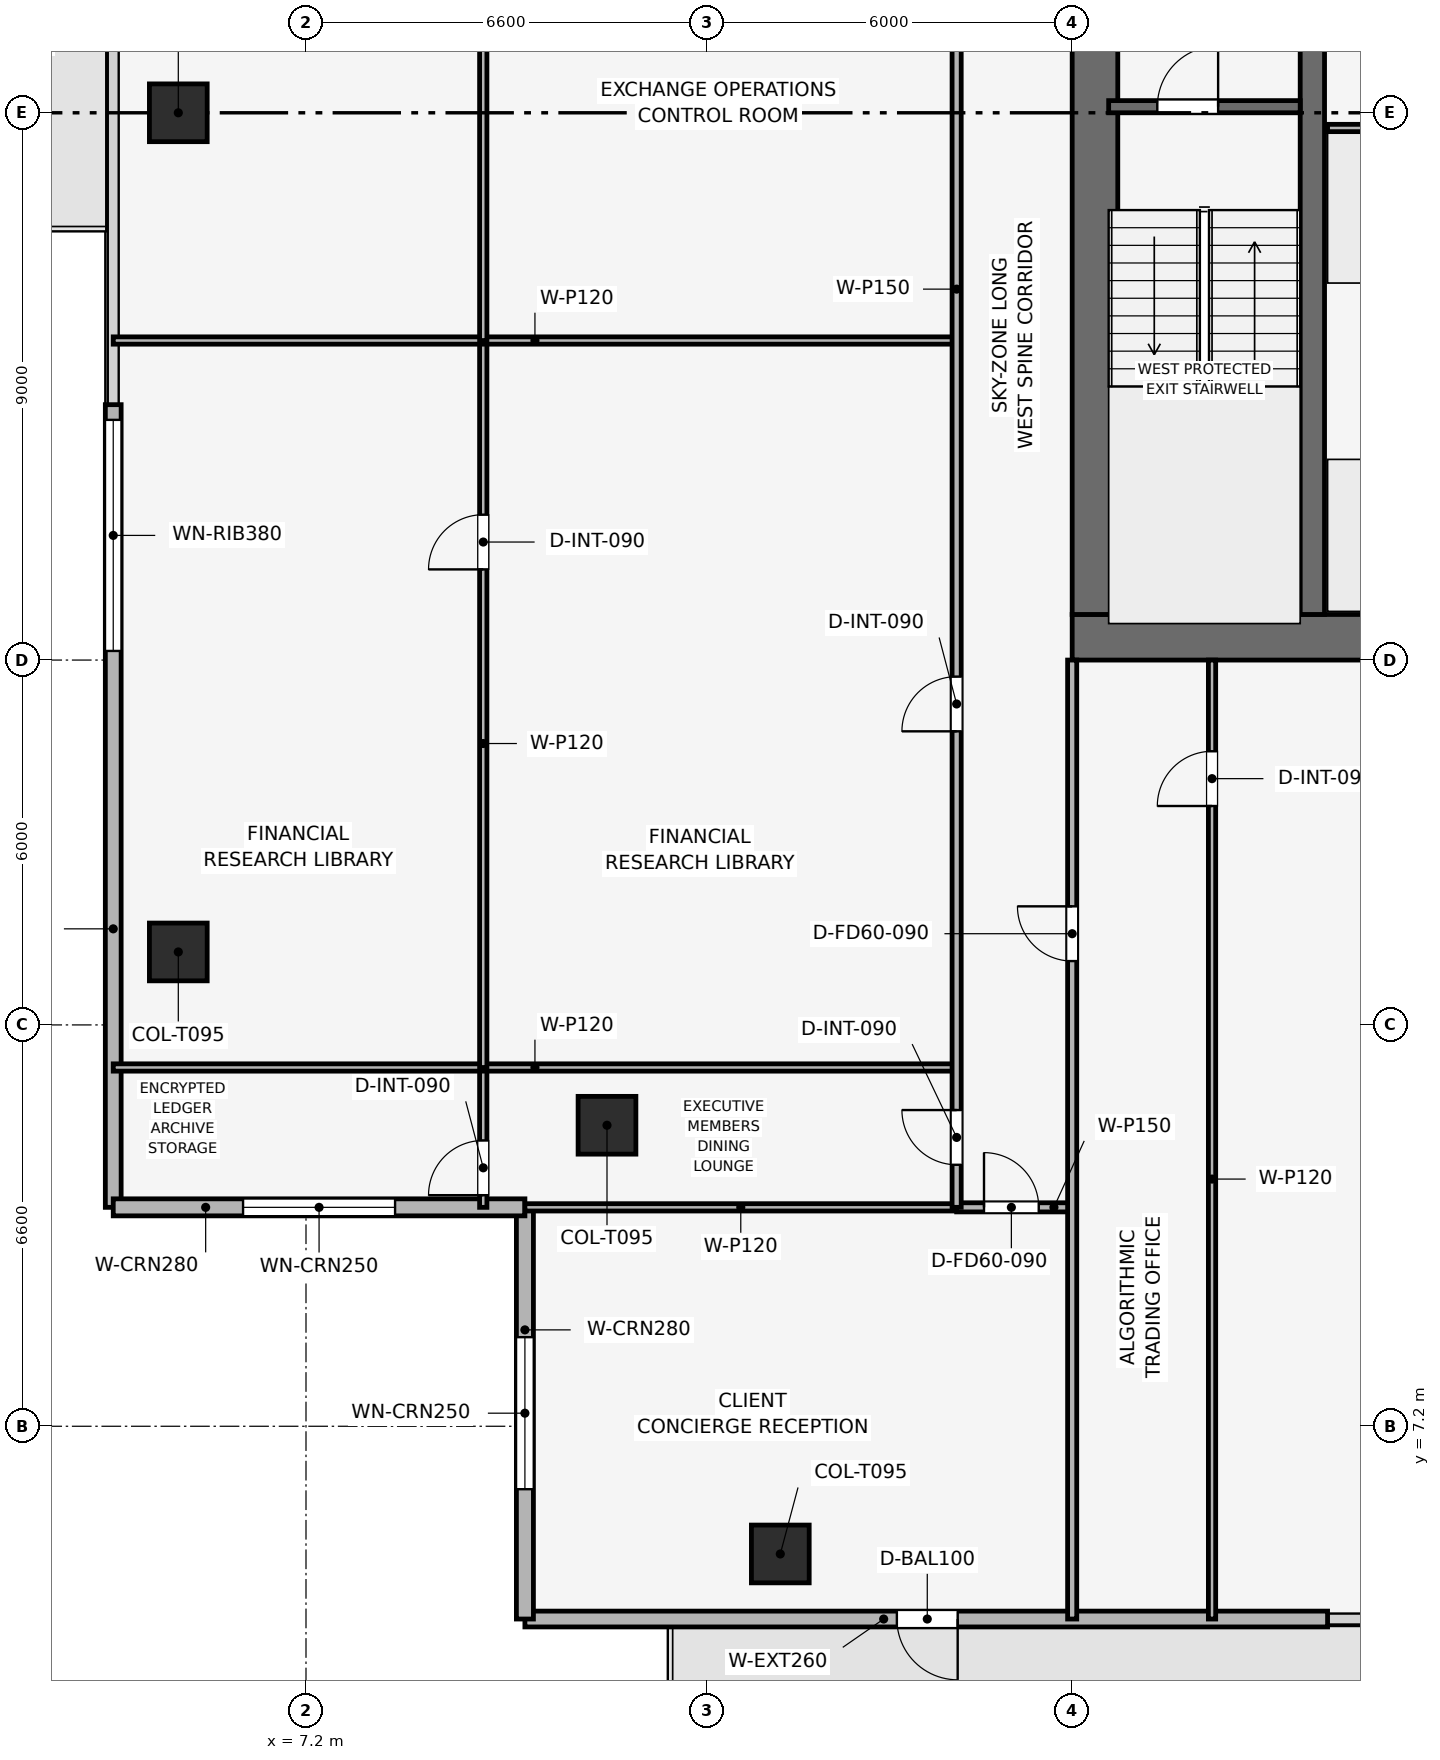
"""IFC4 building model, lengths in metres.
Left out: names, types, materials, properties, quantities, classifications, styles, units other than length and angle.
Written with IfcOpenShell. Run it as: python <this file> out.ifc"""

import sys

from ifc_helpers import new_model, si_unit, direction, frame, frame_2d, origin, origin_2d, place, context, subcontext, project, spatial, rectangle, extrude, element, fill, save


model = new_model("IFC4")
c1 = context("Model", 3, precision=1e-05, world=origin(), true_north=direction((0.0, 1.0)))
c2 = subcontext(c1, "Body", "Model", "MODEL_VIEW")
j1 = project(units=[si_unit("LENGTHUNIT", "METRE"), si_unit("PLANEANGLEUNIT", "RADIAN")], contexts=[c1])
p1 = place(None, origin())
s1 = spatial("IfcSite", under=j1, at=p1, CompositionType="ELEMENT")
p2 = place(p1, origin())
s2 = spatial("IfcBuilding", under=s1, at=p2, CompositionType="ELEMENT")
p3 = place(p2, frame((0.0, 0.0, 254.1)))
s3 = spatial("IfcBuildingStorey", under=s2, at=p3, CompositionType="ELEMENT", Elevation=254.1)
p4 = place(p3, frame((19.8, 20.175, 0.0), z_axis=(0.0, 0.0, 1.0), x_axis=(1.0, 0.0, 0.0)))
e1 = element("IfcWall", 1, at=p4, inside=s3, PredefinedType="SHEAR", context=c2, shape_type="SweptSolid", body=[
    extrude(rectangle(XDim=18.0, YDim=0.75, at=frame_2d((9.0, 0.0))), origin(), (0.0, 0.0, 1.0), 3.75),
])
p5 = place(p3, frame((20.175, 20.55, 0.0), z_axis=(0.0, 0.0, 1.0), x_axis=(0.0, 1.0, 0.0)))
e2 = element("IfcWall", 2, at=p5, inside=s3, PredefinedType="SHEAR", context=c2, shape_type="SweptSolid", body=[
    extrude(rectangle(XDim=16.5, YDim=0.75, at=frame_2d((8.25, 0.0))), origin(), (0.0, 0.0, 1.0), 3.75),
])
p6 = place(p5, frame((10.25, 0.0, 0.0)))
e3 = element("IfcOpeningElement", 3, at=p6, cuts=e2, PredefinedType="OPENING", context=c2, shape_type="SweptSolid", body=[
    extrude(rectangle(XDim=1.1, YDim=2.15, at=frame_2d((0.55, 1.075))), frame((0.0, 0.385, 0.0), z_axis=(0.0, -1.0, 0.0), x_axis=(1.0, 0.0, 0.0)), (0.0, 0.0, 1.0), 0.77),
])
p7 = place(p3, frame((23.75, 20.55, 0.0), z_axis=(0.0, 0.0, 1.0), x_axis=(0.0, 1.0, 0.0)))
e4 = element("IfcWall", 4, at=p7, inside=s3, PredefinedType="SHEAR", context=c2, shape_type="SweptSolid", body=[
    extrude(rectangle(XDim=16.5, YDim=0.4, at=frame_2d((8.25, 0.0))), origin(), (0.0, 0.0, 1.0), 3.75),
])
for number, where, z_axis, x_axis in (
    (5, (15.0, 5.1, 0.003), (0.0, 0.0, 1.0), (1.0, 0.0, 0.0)),
    (6, (5.1, 28.8, 0.003), (0.0, 0.0, 1.0), (1.0, 0.0, 0.0)),
    (7, (5.1, 15.0, 0.003), (0.0, 0.0, 1.0), (1.0, 0.0, 0.0)),
    (8, (12.15, 12.15, 0.003), (0.0, 0.0, 1.0), (1.0, 0.0, 0.0)),
):
    element("IfcColumn", number, at=place(p3, frame(where, z_axis=z_axis, x_axis=x_axis)), inside=s3, PredefinedType="COLUMN", context=c2, shape_type="SweptSolid", body=[
        extrude(rectangle(XDim=0.95, YDim=0.95, at=origin_2d()), origin(), (0.0, 0.0, 1.0), 3.494),
    ])
p8 = place(p3, frame((24.0, 4.03, 0.0), z_axis=(0.0, 0.0, 1.0), x_axis=(-1.0, 0.0, 0.0)))
e9 = element("IfcWall", 9, at=p8, inside=s3, PredefinedType="SOLIDWALL", context=c2, shape_type="SweptSolid", body=[
    extrude(rectangle(XDim=13.2, YDim=0.26, at=frame_2d((6.6, 0.0))), origin(), (0.0, 0.0, 1.0), 3.5),
])
p9 = place(p8, frame((6.083, 0.0, 0.0)))
e10 = element("IfcOpeningElement", 10, at=p9, cuts=e9, PredefinedType="OPENING", context=c2, shape_type="SweptSolid", body=[
    extrude(rectangle(XDim=1.0, YDim=2.2, at=frame_2d((0.5, 1.1))), frame((0.0, 0.14, 0.0), z_axis=(0.0, -1.0, 0.0), x_axis=(1.0, 0.0, 0.0)), (0.0, 0.0, 1.0), 0.28),
])
p10 = place(p3, frame((4.03, 10.8, 0.0), z_axis=(0.0, 0.0, 1.0), x_axis=(0.0, 1.0, 0.0)))
e11 = element("IfcWall", 11, at=p10, inside=s3, PredefinedType="SOLIDWALL", context=c2, shape_type="SweptSolid", body=[
    extrude(rectangle(XDim=13.2, YDim=0.26, at=frame_2d((6.6, 0.0))), origin(), (0.0, 0.0, 1.0), 3.5),
])
p11 = place(p10, frame((9.15, 0.0, 0.9)))
e12 = element("IfcOpeningElement", 12, at=p11, cuts=e11, PredefinedType="OPENING", context=c2, shape_type="SweptSolid", body=[
    extrude(rectangle(XDim=3.8, YDim=1.9, at=frame_2d((1.9, 0.95))), frame((0.0, 0.14, 0.0), z_axis=(0.0, -1.0, 0.0), x_axis=(1.0, 0.0, 0.0)), (0.0, 0.0, 1.0), 0.28),
])
p12 = place(p3, frame((10.8, 4.03, 0.0), z_axis=(0.0, 0.0, 1.0), x_axis=(0.0, 1.0, 0.0)))
e13 = element("IfcWall", 13, at=p12, inside=s3, PredefinedType="SOLIDWALL", context=c2, shape_type="SweptSolid", body=[
    extrude(rectangle(XDim=6.77, YDim=0.28, at=frame_2d((3.385, 0.0))), origin(), (0.0, 0.0, 1.0), 3.5),
])
p13 = place(p12, frame((2.135, 0.0, 0.9)))
e14 = element("IfcOpeningElement", 14, at=p13, cuts=e13, PredefinedType="OPENING", context=c2, shape_type="SweptSolid", body=[
    extrude(rectangle(XDim=2.5, YDim=1.9, at=frame_2d((1.25, 0.95))), frame((0.0, 0.15, 0.0), z_axis=(0.0, -1.0, 0.0), x_axis=(1.0, 0.0, 0.0)), (0.0, 0.0, 1.0), 0.3),
])
p14 = place(p3, frame((10.8, 10.8, 0.0), z_axis=(0.0, 0.0, 1.0), x_axis=(-1.0, 0.0, 0.0)))
e15 = element("IfcWall", 15, at=p14, inside=s3, PredefinedType="SOLIDWALL", context=c2, shape_type="SweptSolid", body=[
    extrude(rectangle(XDim=6.77, YDim=0.28, at=frame_2d((3.385, 0.0))), origin(), (0.0, 0.0, 1.0), 3.5),
])
p15 = place(p14, frame((2.135, 0.0, 0.9)))
e16 = element("IfcOpeningElement", 16, at=p15, cuts=e15, PredefinedType="OPENING", context=c2, shape_type="SweptSolid", body=[
    extrude(rectangle(XDim=2.5, YDim=1.9, at=frame_2d((1.25, 0.95))), frame((0.0, 0.15, 0.0), z_axis=(0.0, -1.0, 0.0), x_axis=(1.0, 0.0, 0.0)), (0.0, 0.0, 1.0), 0.3),
])
p16 = place(p3, frame((20.4, 28.9, 0.0), z_axis=(0.0, 0.0, 1.0), x_axis=(1.0, 0.0, 0.0)))
e17 = element("IfcWall", 17, at=p16, inside=s3, PredefinedType="SHEAR", context=c2, shape_type="SweptSolid", body=[
    extrude(rectangle(XDim=3.15, YDim=0.2, at=frame_2d((1.575, 0.0))), origin(), (0.0, 0.0, 1.0), 3.5),
])
p17 = place(p16, frame((0.8, 0.0, 0.0)))
e18 = element("IfcOpeningElement", 18, at=p17, cuts=e17, PredefinedType="OPENING", context=c2, shape_type="SweptSolid", body=[
    extrude(rectangle(XDim=1.0, YDim=2.1, at=frame_2d((0.5, 1.05))), frame((0.0, 0.11, 0.0), z_axis=(0.0, -1.0, 0.0), x_axis=(1.0, 0.0, 0.0)), (0.0, 0.0, 1.0), 0.22),
])
p18 = place(p3, frame((24.0, 28.55, 0.0), z_axis=(0.0, 0.0, 1.0), x_axis=(1.0, 0.0, 0.0)))
e19 = element("IfcWall", 19, at=p18, inside=s3, PredefinedType="PARTITIONING", context=c2, shape_type="SweptSolid", body=[
    extrude(rectangle(XDim=4.05, YDim=0.12, at=frame_2d((2.025, 0.0))), origin(), (0.0, 0.0, 1.0), 3.5),
])
p19 = place(p18, frame((1.575, 0.0, 0.0)))
e20 = element("IfcOpeningElement", 20, at=p19, cuts=e19, PredefinedType="OPENING", context=c2, shape_type="SweptSolid", body=[
    extrude(rectangle(XDim=0.9, YDim=2.1, at=frame_2d((0.45, 1.05))), frame((0.0, 0.07, 0.0), z_axis=(0.0, -1.0, 0.0), x_axis=(1.0, 0.0, 0.0)), (0.0, 0.0, 1.0), 0.14),
])
p20 = place(p3, frame((10.115, 10.8, 0.0), z_axis=(0.0, 0.0, 1.0), x_axis=(0.0, 1.0, 0.0)))
e21 = element("IfcWall", 21, at=p20, inside=s3, PredefinedType="PARTITIONING", context=c2, shape_type="SweptSolid", body=[
    extrude(rectangle(XDim=2.3, YDim=0.12, at=frame_2d((1.15, 0.0))), origin(), (0.0, 0.0, 1.0), 3.085),
])
p21 = place(p20, frame((0.2, 0.0, 0.0)))
e22 = element("IfcOpeningElement", 22, at=p21, cuts=e21, PredefinedType="OPENING", context=c2, shape_type="SweptSolid", body=[
    extrude(rectangle(XDim=0.9, YDim=2.1, at=frame_2d((0.45, 1.05))), frame((0.0, 0.07, 0.0), z_axis=(0.0, -1.0, 0.0), x_axis=(1.0, 0.0, 0.0)), (0.0, 0.0, 1.0), 0.14),
])
p22 = place(p3, frame((4.03, 13.1, 0.0), z_axis=(0.0, 0.0, 1.0), x_axis=(1.0, 0.0, 0.0)))
e23 = element("IfcWall", 23, at=p22, inside=s3, PredefinedType="PARTITIONING", context=c2, shape_type="SweptSolid", body=[
    extrude(rectangle(XDim=13.87, YDim=0.12, at=frame_2d((6.935, 0.0))), origin(), (0.0, 0.0, 1.0), 3.085),
])
p23 = place(p3, frame((10.115, 13.1, 0.0), z_axis=(0.0, 0.0, 1.0), x_axis=(0.0, 1.0, 0.0)))
e24 = element("IfcWall", 24, at=p23, inside=s3, PredefinedType="PARTITIONING", context=c2, shape_type="SweptSolid", body=[
    extrude(rectangle(XDim=11.955, YDim=0.12, at=frame_2d((5.978, 0.0))), origin(), (0.0, 0.0, 1.0), 3.085),
])
p24 = place(p23, frame((8.191, 0.0, 0.0)))
e25 = element("IfcOpeningElement", 25, at=p24, cuts=e24, PredefinedType="OPENING", context=c2, shape_type="SweptSolid", body=[
    extrude(rectangle(XDim=0.9, YDim=2.1, at=frame_2d((0.45, 1.05))), frame((0.0, 0.07, 0.0), z_axis=(0.0, -1.0, 0.0), x_axis=(1.0, 0.0, 0.0)), (0.0, 0.0, 1.0), 0.14),
])
p25 = place(p3, frame((4.03, 25.055, 0.0), z_axis=(0.0, 0.0, 1.0), x_axis=(1.0, 0.0, 0.0)))
e26 = element("IfcWall", 26, at=p25, inside=s3, PredefinedType="PARTITIONING", context=c2, shape_type="SweptSolid", body=[
    extrude(rectangle(XDim=13.87, YDim=0.12, at=frame_2d((6.935, 0.0))), origin(), (0.0, 0.0, 1.0), 3.085),
])
p26 = place(p3, frame((10.115, 25.055, 0.0), z_axis=(0.0, 0.0, 1.0), x_axis=(0.0, 1.0, 0.0)))
e27 = element("IfcWall", 27, at=p26, inside=s3, PredefinedType="PARTITIONING", context=c2, shape_type="SweptSolid", body=[
    extrude(rectangle(XDim=14.645, YDim=0.12, at=frame_2d((7.323, 0.0))), origin(), (0.0, 0.0, 1.0), 3.085),
])
p27 = place(p26, frame((10.209, 0.0, 0.0)))
e28 = element("IfcOpeningElement", 28, at=p27, cuts=e27, PredefinedType="OPENING", context=c2, shape_type="SweptSolid", body=[
    extrude(rectangle(XDim=0.9, YDim=2.1, at=frame_2d((0.45, 1.05))), frame((0.0, 0.07, 0.0), z_axis=(0.0, -1.0, 0.0), x_axis=(1.0, 0.0, 0.0)), (0.0, 0.0, 1.0), 0.14),
])
p28 = place(p3, frame((10.8, 10.8, 0.0), z_axis=(0.0, 0.0, 1.0), x_axis=(1.0, 0.0, 0.0)))
e29 = element("IfcWall", 29, at=p28, inside=s3, PredefinedType="PARTITIONING", context=c2, shape_type="SweptSolid", body=[
    extrude(rectangle(XDim=7.1, YDim=0.12, at=frame_2d((3.55, 0.0))), origin(), (0.0, 0.0, 1.0), 3.085),
])
p29 = place(p3, frame((17.9, 10.8, 0.0), z_axis=(0.0, 0.0, 1.0), x_axis=(1.0, 0.0, 0.0)))
e30 = element("IfcWall", 30, at=p29, inside=s3, PredefinedType="PARTITIONING", context=c2, shape_type="SweptSolid", body=[
    extrude(rectangle(XDim=1.9, YDim=0.15, at=frame_2d((0.95, 0.0))), origin(), (0.0, 0.0, 1.0), 3.5),
])
p30 = place(p29, frame((0.45, 0.0, 0.0)))
e31 = element("IfcOpeningElement", 31, at=p30, cuts=e30, PredefinedType="OPENING", context=c2, shape_type="SweptSolid", body=[
    extrude(rectangle(XDim=0.9, YDim=2.1, at=frame_2d((0.45, 1.05))), frame((0.0, 0.085, 0.0), z_axis=(0.0, -1.0, 0.0), x_axis=(1.0, 0.0, 0.0)), (0.0, 0.0, 1.0), 0.17),
])
p31 = place(p3, frame((19.8, 4.03, 0.0), z_axis=(0.0, 0.0, 1.0), x_axis=(0.0, 1.0, 0.0)))
e32 = element("IfcWall", 32, at=p31, inside=s3, PredefinedType="PARTITIONING", context=c2, shape_type="SweptSolid", body=[
    extrude(rectangle(XDim=15.77, YDim=0.15, at=frame_2d((7.885, 0.0))), origin(), (0.0, 0.0, 1.0), 3.085),
])
p32 = place(p31, frame((10.82, 0.0, 0.0)))
e33 = element("IfcOpeningElement", 33, at=p32, cuts=e32, PredefinedType="OPENING", context=c2, shape_type="SweptSolid", body=[
    extrude(rectangle(XDim=0.9, YDim=2.1, at=frame_2d((0.45, 1.05))), frame((0.0, 0.085, 0.0), z_axis=(0.0, -1.0, 0.0), x_axis=(1.0, 0.0, 0.0)), (0.0, 0.0, 1.0), 0.17),
])
p33 = place(p3, frame((22.1, 4.03, 0.0), z_axis=(0.0, 0.0, 1.0), x_axis=(0.0, 1.0, 0.0)))
e34 = element("IfcWall", 34, at=p33, inside=s3, PredefinedType="PARTITIONING", context=c2, shape_type="SweptSolid", body=[
    extrude(rectangle(XDim=15.77, YDim=0.12, at=frame_2d((7.885, 0.0))), origin(), (0.0, 0.0, 1.0), 3.085),
])
p34 = place(p33, frame((13.37, 0.0, 0.0)))
e35 = element("IfcOpeningElement", 35, at=p34, cuts=e34, PredefinedType="OPENING", context=c2, shape_type="SweptSolid", body=[
    extrude(rectangle(XDim=0.9, YDim=2.1, at=frame_2d((0.45, 1.05))), frame((0.0, 0.07, 0.0), z_axis=(0.0, -1.0, 0.0), x_axis=(1.0, 0.0, 0.0)), (0.0, 0.0, 1.0), 0.14),
])
p35 = place(p3, frame((17.9, 10.8, 0.0), z_axis=(0.0, 0.0, 1.0), x_axis=(0.0, 1.0, 0.0)))
e36 = element("IfcWall", 36, at=p35, inside=s3, PredefinedType="PARTITIONING", context=c2, shape_type="SweptSolid", body=[
    extrude(rectangle(XDim=28.9, YDim=0.15, at=frame_2d((14.45, 0.0))), origin(), (0.0, 0.0, 1.0), 3.085),
])
p36 = place(p35, frame((0.7, 0.0, 0.0)))
e37 = element("IfcOpeningElement", 37, at=p36, cuts=e36, PredefinedType="OPENING", context=c2, shape_type="SweptSolid", body=[
    extrude(rectangle(XDim=0.9, YDim=2.1, at=frame_2d((0.45, 1.05))), frame((0.0, 0.085, 0.0), z_axis=(0.0, -1.0, 0.0), x_axis=(1.0, 0.0, 0.0)), (0.0, 0.0, 1.0), 0.17),
])
p37 = place(p35, frame((7.828, 0.0, 0.0)))
e38 = element("IfcOpeningElement", 38, at=p37, cuts=e36, PredefinedType="OPENING", context=c2, shape_type="SweptSolid", body=[
    extrude(rectangle(XDim=0.9, YDim=2.1, at=frame_2d((0.45, 1.05))), frame((0.0, 0.085, 0.0), z_axis=(0.0, -1.0, 0.0), x_axis=(1.0, 0.0, 0.0)), (0.0, 0.0, 1.0), 0.17),
])
p38 = place(p35, frame((21.127, 0.0, 0.0)))
e39 = element("IfcOpeningElement", 39, at=p38, cuts=e36, PredefinedType="OPENING", context=c2, shape_type="SweptSolid", body=[
    extrude(rectangle(XDim=0.9, YDim=2.1, at=frame_2d((0.45, 1.05))), frame((0.0, 0.085, 0.0), z_axis=(0.0, -1.0, 0.0), x_axis=(1.0, 0.0, 0.0)), (0.0, 0.0, 1.0), 0.17),
])
p39 = place(p9, origin())
e40 = element("IfcDoor", 40, at=p39, inside=s3, OperationType="SINGLE_SWING_LEFT", PredefinedType="DOOR", context=c2, shape_type="SweptSolid", body=[
    extrude(rectangle(XDim=1.0, YDim=2.2, at=frame_2d((0.5, 1.1))), frame((0.0, 0.025, 0.0), z_axis=(0.0, -1.0, 0.0), x_axis=(1.0, 0.0, 0.0)), (0.0, 0.0, 1.0), 0.05),
])
fill(e10, e40)
p40 = place(p11, origin())
e41 = element("IfcWindow", 41, at=p40, inside=s3, PartitioningType="SINGLE_PANEL", PredefinedType="WINDOW", context=c2, shape_type="SweptSolid", body=[
    extrude(rectangle(XDim=3.8, YDim=1.9, at=frame_2d((1.9, 0.95))), frame((0.0, 0.03, 0.0), z_axis=(0.0, -1.0, 0.0), x_axis=(1.0, 0.0, 0.0)), (0.0, 0.0, 1.0), 0.06),
])
fill(e12, e41)
p41 = place(p13, origin())
e42 = element("IfcWindow", 42, at=p41, inside=s3, PartitioningType="SINGLE_PANEL", PredefinedType="WINDOW", context=c2, shape_type="SweptSolid", body=[
    extrude(rectangle(XDim=2.5, YDim=1.9, at=frame_2d((1.25, 0.95))), frame((0.0, 0.03, 0.0), z_axis=(0.0, -1.0, 0.0), x_axis=(1.0, 0.0, 0.0)), (0.0, 0.0, 1.0), 0.06),
])
fill(e14, e42)
p42 = place(p15, origin())
e43 = element("IfcWindow", 43, at=p42, inside=s3, PartitioningType="SINGLE_PANEL", PredefinedType="WINDOW", context=c2, shape_type="SweptSolid", body=[
    extrude(rectangle(XDim=2.5, YDim=1.9, at=frame_2d((1.25, 0.95))), frame((0.0, 0.03, 0.0), z_axis=(0.0, -1.0, 0.0), x_axis=(1.0, 0.0, 0.0)), (0.0, 0.0, 1.0), 0.06),
])
fill(e16, e43)
p43 = place(p17, origin())
e44 = element("IfcDoor", 44, at=p43, inside=s3, OperationType="SINGLE_SWING_RIGHT", PredefinedType="DOOR", context=c2, shape_type="SweptSolid", body=[
    extrude(rectangle(XDim=1.0, YDim=2.1, at=frame_2d((0.5, 1.05))), frame((0.0, 0.025, 0.0), z_axis=(0.0, -1.0, 0.0), x_axis=(1.0, 0.0, 0.0)), (0.0, 0.0, 1.0), 0.05),
])
fill(e18, e44)
p44 = place(p21, origin())
e45 = element("IfcDoor", 45, at=p44, inside=s3, OperationType="SINGLE_SWING_LEFT", PredefinedType="DOOR", context=c2, shape_type="SweptSolid", body=[
    extrude(rectangle(XDim=0.9, YDim=2.1, at=frame_2d((0.45, 1.05))), frame((0.0, 0.025, 0.0), z_axis=(0.0, -1.0, 0.0), x_axis=(1.0, 0.0, 0.0)), (0.0, 0.0, 1.0), 0.05),
])
fill(e22, e45)
p45 = place(p24, origin())
e46 = element("IfcDoor", 46, at=p45, inside=s3, OperationType="SINGLE_SWING_LEFT", PredefinedType="DOOR", context=c2, shape_type="SweptSolid", body=[
    extrude(rectangle(XDim=0.9, YDim=2.1, at=frame_2d((0.45, 1.05))), frame((0.0, 0.025, 0.0), z_axis=(0.0, -1.0, 0.0), x_axis=(1.0, 0.0, 0.0)), (0.0, 0.0, 1.0), 0.05),
])
fill(e25, e46)
p46 = place(p30, origin())
e47 = element("IfcDoor", 47, at=p46, inside=s3, OperationType="SINGLE_SWING_LEFT", PredefinedType="DOOR", context=c2, shape_type="SweptSolid", body=[
    extrude(rectangle(XDim=0.9, YDim=2.1, at=frame_2d((0.45, 1.05))), frame((0.0, 0.025, 0.0), z_axis=(0.0, -1.0, 0.0), x_axis=(1.0, 0.0, 0.0)), (0.0, 0.0, 1.0), 0.05),
])
fill(e31, e47)
p47 = place(p32, origin())
e48 = element("IfcDoor", 48, at=p47, inside=s3, OperationType="SINGLE_SWING_RIGHT", PredefinedType="DOOR", context=c2, shape_type="SweptSolid", body=[
    extrude(rectangle(XDim=0.9, YDim=2.1, at=frame_2d((0.45, 1.05))), frame((0.0, 0.025, 0.0), z_axis=(0.0, -1.0, 0.0), x_axis=(1.0, 0.0, 0.0)), (0.0, 0.0, 1.0), 0.05),
])
fill(e33, e48)
p48 = place(p34, origin())
e49 = element("IfcDoor", 49, at=p48, inside=s3, OperationType="SINGLE_SWING_LEFT", PredefinedType="DOOR", context=c2, shape_type="SweptSolid", body=[
    extrude(rectangle(XDim=0.9, YDim=2.1, at=frame_2d((0.45, 1.05))), frame((0.0, 0.025, 0.0), z_axis=(0.0, -1.0, 0.0), x_axis=(1.0, 0.0, 0.0)), (0.0, 0.0, 1.0), 0.05),
])
fill(e35, e49)
p49 = place(p36, origin())
e50 = element("IfcDoor", 50, at=p49, inside=s3, OperationType="SINGLE_SWING_RIGHT", PredefinedType="DOOR", context=c2, shape_type="SweptSolid", body=[
    extrude(rectangle(XDim=0.9, YDim=2.1, at=frame_2d((0.45, 1.05))), frame((0.0, 0.025, 0.0), z_axis=(0.0, -1.0, 0.0), x_axis=(1.0, 0.0, 0.0)), (0.0, 0.0, 1.0), 0.05),
])
fill(e37, e50)
p50 = place(p37, origin())
e51 = element("IfcDoor", 51, at=p50, inside=s3, OperationType="SINGLE_SWING_LEFT", PredefinedType="DOOR", context=c2, shape_type="SweptSolid", body=[
    extrude(rectangle(XDim=0.9, YDim=2.1, at=frame_2d((0.45, 1.05))), frame((0.0, 0.025, 0.0), z_axis=(0.0, -1.0, 0.0), x_axis=(1.0, 0.0, 0.0)), (0.0, 0.0, 1.0), 0.05),
])
fill(e38, e51)
save(model, sys.argv[1])
